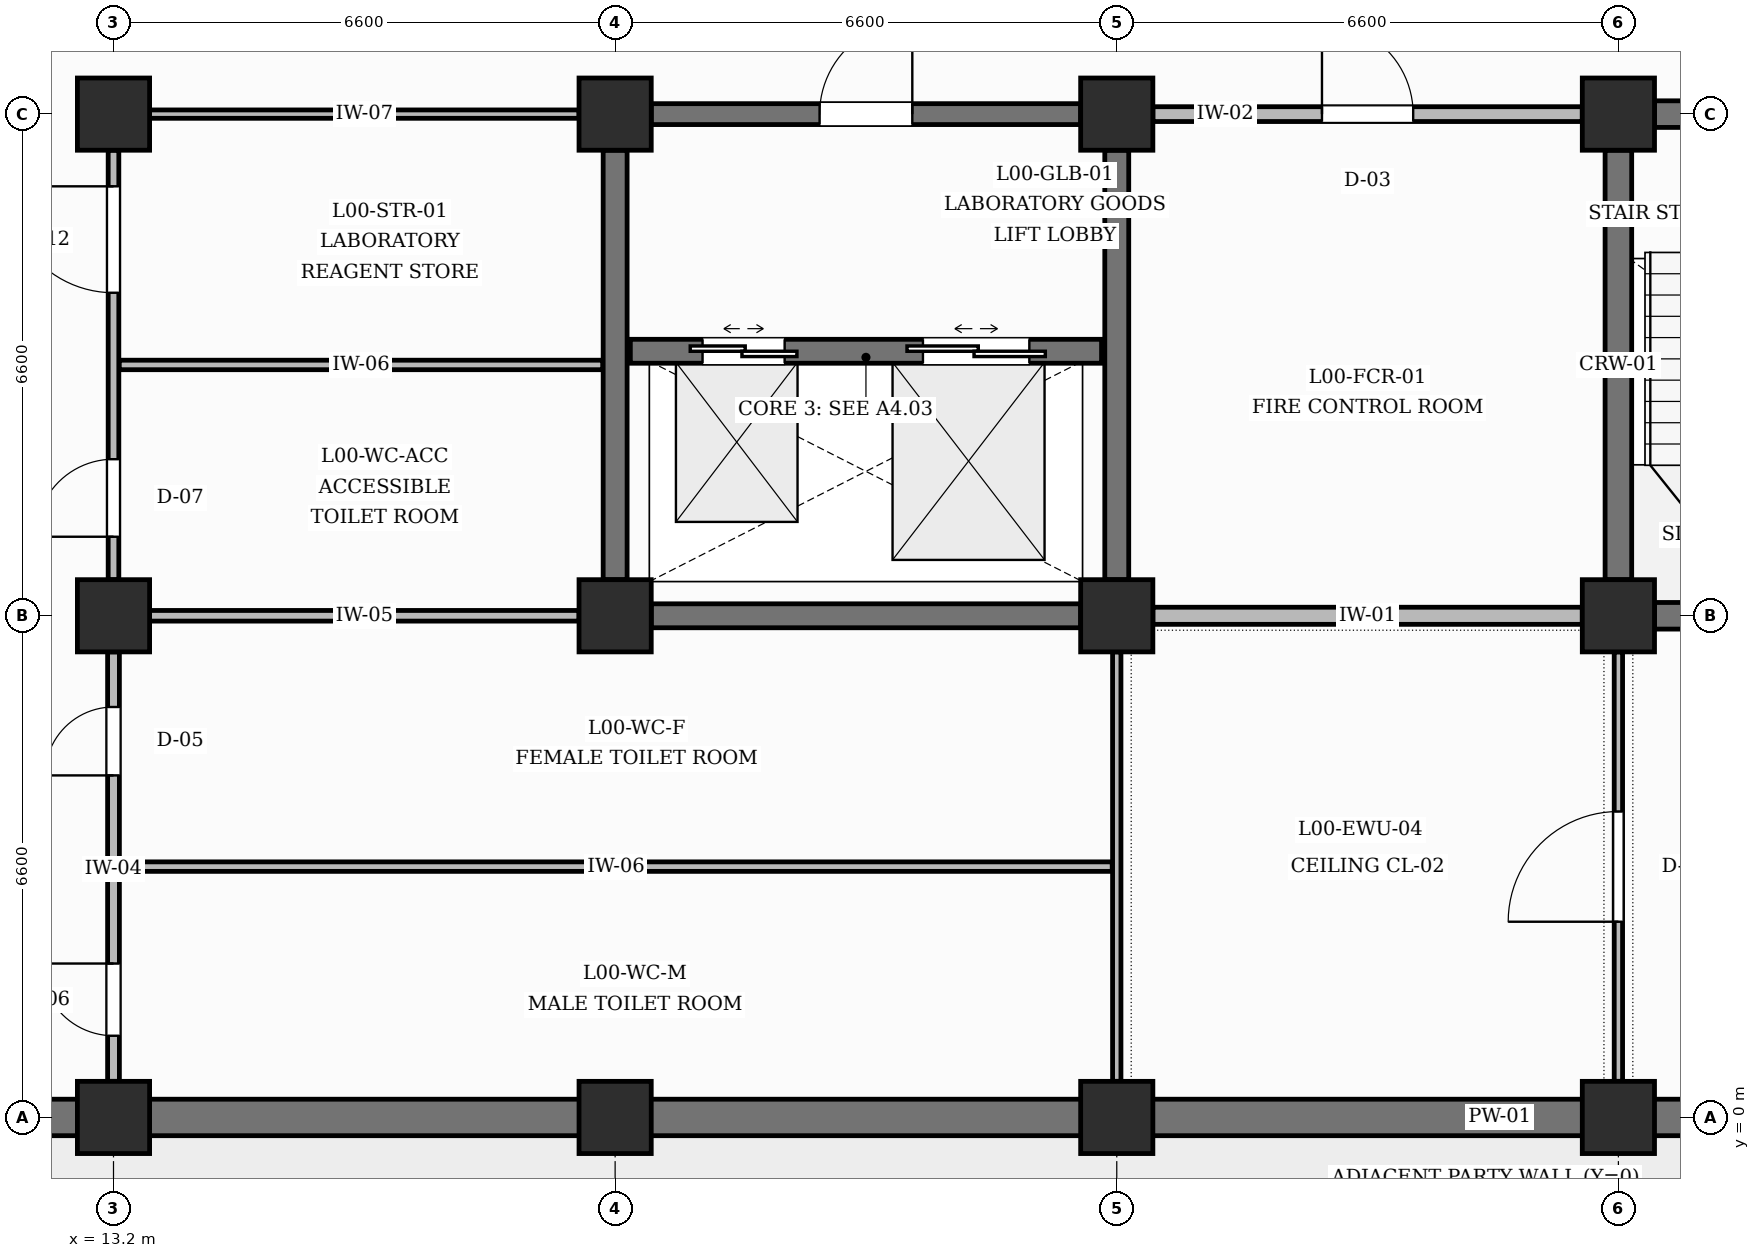
"""IFC4 building model, lengths in metres.
Left out: names, types, materials, properties, quantities, classifications, styles, units other than length and angle.
Written with IfcOpenShell. Run it as: python <this file> out.ifc"""

import sys

from ifc_helpers import new_model, si_unit, direction, frame, frame_2d, origin, origin_2d, place, context, subcontext, project, spatial, rectangle, extrude, element, fill, save


model = new_model("IFC4")
c1 = context("Model", 3, precision=1e-05, world=origin(), true_north=direction((0.0, 1.0)))
c2 = subcontext(c1, "Body", "Model", "MODEL_VIEW")
j1 = project(units=[si_unit("LENGTHUNIT", "METRE"), si_unit("PLANEANGLEUNIT", "RADIAN")], contexts=[c1])
p1 = place(None, origin())
s1 = spatial("IfcSite", under=j1, at=p1, CompositionType="ELEMENT")
p2 = place(p1, origin())
s2 = spatial("IfcBuilding", under=s1, at=p2, CompositionType="ELEMENT")
p3 = place(p2, origin())
s3 = spatial("IfcBuildingStorey", under=s2, at=p3, CompositionType="ELEMENT", Elevation=0.0)
for number, where, z_axis, x_axis in (
    (1, (13.2, 0.0, 0.0), (0.0, 0.0, 1.0), (1.0, 0.0, 0.0)),
    (2, (13.2, 6.6, 0.0), (0.0, 0.0, 1.0), (1.0, 0.0, 0.0)),
    (3, (13.2, 13.2, 0.0), (0.0, 0.0, 1.0), (1.0, 0.0, 0.0)),
    (4, (19.8, 0.0, 0.0), (0.0, 0.0, 1.0), (1.0, 0.0, 0.0)),
    (5, (19.8, 6.6, 0.0), (0.0, 0.0, 1.0), (1.0, 0.0, 0.0)),
    (6, (19.8, 13.2, 0.0), (0.0, 0.0, 1.0), (1.0, 0.0, 0.0)),
    (7, (26.4, 0.0, 0.0), (0.0, 0.0, 1.0), (1.0, 0.0, 0.0)),
    (8, (26.4, 6.6, 0.0), (0.0, 0.0, 1.0), (1.0, 0.0, 0.0)),
    (9, (26.4, 13.2, 0.0), (0.0, 0.0, 1.0), (1.0, 0.0, 0.0)),
    (10, (33.0, 0.0, 0.0), (0.0, 0.0, 1.0), (1.0, 0.0, 0.0)),
    (11, (33.0, 6.6, 0.0), (0.0, 0.0, 1.0), (1.0, 0.0, 0.0)),
    (12, (33.0, 13.2, 0.0), (0.0, 0.0, 1.0), (1.0, 0.0, 0.0)),
):
    element("IfcColumn", number, at=place(p3, frame(where, z_axis=z_axis, x_axis=x_axis)), inside=s3, PredefinedType="COLUMN", context=c2, shape_type="SweptSolid", body=[
        extrude(rectangle(XDim=0.95, YDim=0.95, at=origin_2d()), origin(), (0.0, 0.0, 1.0), 5.4),
    ])
p4 = place(p3, frame((7.075, 0.0, 0.0), z_axis=(0.0, 0.0, 1.0), x_axis=(1.0, 0.0, 0.0)))
e13 = element("IfcWall", 13, at=p4, inside=s3, PredefinedType="SOLIDWALL", context=c2, shape_type="SweptSolid", body=[
    extrude(rectangle(XDim=5.65, YDim=0.48, at=frame_2d((2.825, 0.0))), origin(), (0.0, 0.0, 1.0), 4.45),
])
p5 = place(p3, frame((13.675, 0.0, 0.0), z_axis=(0.0, 0.0, 1.0), x_axis=(1.0, 0.0, 0.0)))
e14 = element("IfcWall", 14, at=p5, inside=s3, PredefinedType="SOLIDWALL", context=c2, shape_type="SweptSolid", body=[
    extrude(rectangle(XDim=5.65, YDim=0.48, at=frame_2d((2.825, 0.0))), origin(), (0.0, 0.0, 1.0), 4.45),
])
p6 = place(p3, frame((20.275, 0.0, 0.0), z_axis=(0.0, 0.0, 1.0), x_axis=(1.0, 0.0, 0.0)))
e15 = element("IfcWall", 15, at=p6, inside=s3, PredefinedType="SOLIDWALL", context=c2, shape_type="SweptSolid", body=[
    extrude(rectangle(XDim=5.65, YDim=0.48, at=frame_2d((2.825, 0.0))), origin(), (0.0, 0.0, 1.0), 4.45),
])
p7 = place(p3, frame((26.875, 0.0, 0.0), z_axis=(0.0, 0.0, 1.0), x_axis=(1.0, 0.0, 0.0)))
e16 = element("IfcWall", 16, at=p7, inside=s3, PredefinedType="SOLIDWALL", context=c2, shape_type="SweptSolid", body=[
    extrude(rectangle(XDim=5.65, YDim=0.48, at=frame_2d((2.825, 0.0))), origin(), (0.0, 0.0, 1.0), 4.45),
])
p8 = place(p3, frame((33.475, 0.0, 0.0), z_axis=(0.0, 0.0, 1.0), x_axis=(1.0, 0.0, 0.0)))
e17 = element("IfcWall", 17, at=p8, inside=s3, PredefinedType="SOLIDWALL", context=c2, shape_type="SweptSolid", body=[
    extrude(rectangle(XDim=5.675, YDim=0.48, at=frame_2d((2.837, 0.0))), origin(), (0.0, 0.0, 1.0), 4.45),
])
p9 = place(p3, frame((33.475, 6.6, 0.0), z_axis=(0.0, 0.0, 1.0), x_axis=(1.0, 0.0, 0.0)))
e18 = element("IfcWall", 18, at=p9, inside=s3, PredefinedType="SHEAR", context=c2, shape_type="SweptSolid", body=[
    extrude(rectangle(XDim=5.675, YDim=0.35, at=frame_2d((2.837, 0.0))), origin(), (0.0, 0.0, 1.0), 4.2),
])
p10 = place(p3, frame((33.475, 13.2, 0.0), z_axis=(0.0, 0.0, 1.0), x_axis=(1.0, 0.0, 0.0)))
e19 = element("IfcWall", 19, at=p10, inside=s3, PredefinedType="SHEAR", context=c2, shape_type="SweptSolid", body=[
    extrude(rectangle(XDim=5.675, YDim=0.35, at=frame_2d((2.837, 0.0))), origin(), (0.0, 0.0, 1.0), 4.3),
])
p11 = place(p10, frame((2.262, 0.0, 0.0)))
e20 = element("IfcOpeningElement", 20, at=p11, cuts=e19, PredefinedType="OPENING", context=c2, shape_type="SweptSolid", body=[
    extrude(rectangle(XDim=1.15, YDim=2.2, at=frame_2d((0.575, 1.1))), frame((0.0, 0.185, 0.0), z_axis=(0.0, -1.0, 0.0), x_axis=(1.0, 0.0, 0.0)), (0.0, 0.0, 1.0), 0.37),
])
p12 = place(p3, frame((33.0, 7.075, 0.0), z_axis=(0.0, 0.0, 1.0), x_axis=(0.0, 1.0, 0.0)))
e21 = element("IfcWall", 21, at=p12, inside=s3, PredefinedType="SHEAR", context=c2, shape_type="SweptSolid", body=[
    extrude(rectangle(XDim=5.65, YDim=0.35, at=frame_2d((2.825, 0.0))), origin(), (0.0, 0.0, 1.0), 4.3),
])
p13 = place(p3, frame((20.275, 6.6, 0.0), z_axis=(0.0, 0.0, 1.0), x_axis=(1.0, 0.0, 0.0)))
e22 = element("IfcWall", 22, at=p13, inside=s3, PredefinedType="SHEAR", context=c2, shape_type="SweptSolid", body=[
    extrude(rectangle(XDim=5.65, YDim=0.315, at=frame_2d((2.825, 0.0))), origin(), (0.0, 0.0, 1.0), 4.2),
])
for number, where, z_axis, x_axis in (
    (23, (19.8, 7.075, 0.0), (0.0, 0.0, 1.0), (0.0, 1.0, 0.0)),
    (24, (26.4, 7.075, 0.0), (0.0, 0.0, 1.0), (0.0, 1.0, 0.0)),
):
    element("IfcWall", number, at=place(p3, frame(where, z_axis=z_axis, x_axis=x_axis)), inside=s3, PredefinedType="SHEAR", context=c2, shape_type="SweptSolid", body=[
        extrude(rectangle(XDim=5.65, YDim=0.315, at=frame_2d((2.825, 0.0))), origin(), (0.0, 0.0, 1.0), 4.3),
    ])
p14 = place(p3, frame((20.275, 13.2, 0.0), z_axis=(0.0, 0.0, 1.0), x_axis=(1.0, 0.0, 0.0)))
e25 = element("IfcWall", 25, at=p14, inside=s3, PredefinedType="SHEAR", context=c2, shape_type="SweptSolid", body=[
    extrude(rectangle(XDim=5.65, YDim=0.275, at=frame_2d((2.825, 0.0))), origin(), (0.0, 0.0, 1.0), 4.3),
])
p15 = place(p14, frame((2.215, 0.0, 0.0)))
e26 = element("IfcOpeningElement", 26, at=p15, cuts=e25, PredefinedType="OPENING", context=c2, shape_type="SweptSolid", body=[
    extrude(rectangle(XDim=1.22, YDim=2.15, at=frame_2d((0.61, 1.075))), frame((0.0, 0.147, 0.0), z_axis=(0.0, -1.0, 0.0), x_axis=(1.0, 0.0, 0.0)), (0.0, 0.0, 1.0), 0.295),
])
p16 = place(p3, frame((20.0, 10.08, 0.0), z_axis=(0.0, 0.0, 1.0), x_axis=(1.0, 0.0, 0.0)))
e27 = element("IfcWall", 27, at=p16, inside=s3, PredefinedType="SHEAR", context=c2, shape_type="SweptSolid", body=[
    extrude(rectangle(XDim=6.2, YDim=0.315, at=frame_2d((3.1, 0.0))), origin(), (0.0, 0.0, 1.0), 5.05),
])
p17 = place(p16, frame((0.95, 0.0, 0.0)))
e28 = element("IfcOpeningElement", 28, at=p17, cuts=e27, PredefinedType="OPENING", context=c2, shape_type="SweptSolid", body=[
    extrude(rectangle(XDim=1.08, YDim=2.15, at=frame_2d((0.54, 1.075))), frame((0.0, 0.167, 0.0), z_axis=(0.0, -1.0, 0.0), x_axis=(1.0, 0.0, 0.0)), (0.0, 0.0, 1.0), 0.335),
])
p18 = place(p16, frame((3.85, 0.0, 0.0)))
e29 = element("IfcOpeningElement", 29, at=p18, cuts=e27, PredefinedType="OPENING", context=c2, shape_type="SweptSolid", body=[
    extrude(rectangle(XDim=1.4, YDim=2.35, at=frame_2d((0.7, 1.175))), frame((0.0, 0.167, 0.0), z_axis=(0.0, -1.0, 0.0), x_axis=(1.0, 0.0, 0.0)), (0.0, 0.0, 1.0), 0.335),
])
p19 = place(p3, frame((13.2, 0.475, 0.0), z_axis=(0.0, 0.0, 1.0), x_axis=(0.0, 1.0, 0.0)))
e30 = element("IfcWall", 30, at=p19, inside=s3, PredefinedType="PARTITIONING", context=c2, shape_type="SweptSolid", body=[
    extrude(rectangle(XDim=5.65, YDim=0.155, at=frame_2d((2.825, 0.0))), origin(), (0.0, 0.0, 1.0), 4.3),
])
p20 = place(p19, frame((0.6, 0.0, 0.0)))
e31 = element("IfcOpeningElement", 31, at=p20, cuts=e30, PredefinedType="OPENING", context=c2, shape_type="SweptSolid", body=[
    extrude(rectangle(XDim=0.95, YDim=2.1, at=frame_2d((0.475, 1.05))), frame((0.0, 0.087, 0.0), z_axis=(0.0, -1.0, 0.0), x_axis=(1.0, 0.0, 0.0)), (0.0, 0.0, 1.0), 0.175),
])
p21 = place(p19, frame((4.025, 0.0, 0.0)))
e32 = element("IfcOpeningElement", 32, at=p21, cuts=e30, PredefinedType="OPENING", context=c2, shape_type="SweptSolid", body=[
    extrude(rectangle(XDim=0.9, YDim=2.1, at=frame_2d((0.45, 1.05))), frame((0.0, 0.087, 0.0), z_axis=(0.0, -1.0, 0.0), x_axis=(1.0, 0.0, 0.0)), (0.0, 0.0, 1.0), 0.175),
])
p22 = place(p3, frame((26.4, 0.475, 0.0), z_axis=(0.0, 0.0, 1.0), x_axis=(0.0, 1.0, 0.0)))
e33 = element("IfcWall", 33, at=p22, inside=s3, PredefinedType="PARTITIONING", context=c2, shape_type="SweptSolid", body=[
    extrude(rectangle(XDim=5.65, YDim=0.11, at=frame_2d((2.825, 0.0))), origin(), (0.0, 0.0, 1.0), 4.3),
])
p23 = place(p3, frame((13.675, 6.6, 0.0), z_axis=(0.0, 0.0, 1.0), x_axis=(1.0, 0.0, 0.0)))
e34 = element("IfcWall", 34, at=p23, inside=s3, PredefinedType="PARTITIONING", context=c2, shape_type="SweptSolid", body=[
    extrude(rectangle(XDim=5.65, YDim=0.14, at=frame_2d((2.825, 0.0))), origin(), (0.0, 0.0, 1.0), 4.3),
])
p24 = place(p3, frame((13.2, 7.075, 0.0), z_axis=(0.0, 0.0, 1.0), x_axis=(0.0, 1.0, 0.0)))
e35 = element("IfcWall", 35, at=p24, inside=s3, PredefinedType="PARTITIONING", context=c2, shape_type="SweptSolid", body=[
    extrude(rectangle(XDim=5.65, YDim=0.14, at=frame_2d((2.825, 0.0))), origin(), (0.0, 0.0, 1.0), 4.3),
])
p25 = place(p24, frame((0.565, 0.0, 0.0)))
e36 = element("IfcOpeningElement", 36, at=p25, cuts=e35, PredefinedType="OPENING", context=c2, shape_type="SweptSolid", body=[
    extrude(rectangle(XDim=1.02, YDim=2.15, at=frame_2d((0.51, 1.075))), frame((0.0, 0.08, 0.0), z_axis=(0.0, -1.0, 0.0), x_axis=(1.0, 0.0, 0.0)), (0.0, 0.0, 1.0), 0.16),
])
p26 = place(p24, frame((3.775, 0.0, 0.0)))
e37 = element("IfcOpeningElement", 37, at=p26, cuts=e35, PredefinedType="OPENING", context=c2, shape_type="SweptSolid", body=[
    extrude(rectangle(XDim=1.4, YDim=2.25, at=frame_2d((0.7, 1.125))), frame((0.0, 0.08, 0.0), z_axis=(0.0, -1.0, 0.0), x_axis=(1.0, 0.0, 0.0)), (0.0, 0.0, 1.0), 0.16),
])
p27 = place(p3, frame((13.675, 13.2, 0.0), z_axis=(0.0, 0.0, 1.0), x_axis=(1.0, 0.0, 0.0)))
e38 = element("IfcWall", 38, at=p27, inside=s3, PredefinedType="PARTITIONING", context=c2, shape_type="SweptSolid", body=[
    extrude(rectangle(XDim=5.65, YDim=0.11, at=frame_2d((2.825, 0.0))), origin(), (0.0, 0.0, 1.0), 4.2),
])
p28 = place(p3, frame((33.0, 0.475, 0.0), z_axis=(0.0, 0.0, 1.0), x_axis=(0.0, 1.0, 0.0)))
e39 = element("IfcWall", 39, at=p28, inside=s3, PredefinedType="PARTITIONING", context=c2, shape_type="SweptSolid", body=[
    extrude(rectangle(XDim=5.65, YDim=0.11, at=frame_2d((2.825, 0.0))), origin(), (0.0, 0.0, 1.0), 4.3),
])
p29 = place(p28, frame((2.1, 0.0, 0.0)))
e40 = element("IfcOpeningElement", 40, at=p29, cuts=e39, PredefinedType="OPENING", context=c2, shape_type="SweptSolid", body=[
    extrude(rectangle(XDim=1.45, YDim=2.25, at=frame_2d((0.725, 1.125))), frame((0.0, 0.065, 0.0), z_axis=(0.0, -1.0, 0.0), x_axis=(1.0, 0.0, 0.0)), (0.0, 0.0, 1.0), 0.13),
])
p30 = place(p3, frame((26.875, 6.6, 0.0), z_axis=(0.0, 0.0, 1.0), x_axis=(1.0, 0.0, 0.0)))
e41 = element("IfcWall", 41, at=p30, inside=s3, PredefinedType="PARTITIONING", context=c2, shape_type="SweptSolid", body=[
    extrude(rectangle(XDim=5.65, YDim=0.225, at=frame_2d((2.825, 0.0))), origin(), (0.0, 0.0, 1.0), 4.3),
])
p31 = place(p3, frame((26.875, 13.2, 0.0), z_axis=(0.0, 0.0, 1.0), x_axis=(1.0, 0.0, 0.0)))
e42 = element("IfcWall", 42, at=p31, inside=s3, PredefinedType="PARTITIONING", context=c2, shape_type="SweptSolid", body=[
    extrude(rectangle(XDim=5.65, YDim=0.195, at=frame_2d((2.825, 0.0))), origin(), (0.0, 0.0, 1.0), 4.2),
])
p32 = place(p31, frame((2.225, 0.0, 0.0)))
e43 = element("IfcOpeningElement", 43, at=p32, cuts=e42, PredefinedType="OPENING", context=c2, shape_type="SweptSolid", body=[
    extrude(rectangle(XDim=1.2, YDim=2.25, at=frame_2d((0.6, 1.125))), frame((0.0, 0.107, 0.0), z_axis=(0.0, -1.0, 0.0), x_axis=(1.0, 0.0, 0.0)), (0.0, 0.0, 1.0), 0.215),
])
p33 = place(p3, frame((13.282, 3.3, 0.0), z_axis=(0.0, 0.0, 1.0), x_axis=(1.0, 0.0, 0.0)))
e44 = element("IfcWall", 44, at=p33, inside=s3, PredefinedType="PARTITIONING", context=c2, shape_type="SweptSolid", body=[
    extrude(rectangle(XDim=13.058, YDim=0.125, at=frame_2d((6.529, 0.0))), origin(), (0.0, 0.0, 1.0), 5.05),
])
p34 = place(p3, frame((13.275, 9.9, 0.0), z_axis=(0.0, 0.0, 1.0), x_axis=(1.0, 0.0, 0.0)))
e45 = element("IfcWall", 45, at=p34, inside=s3, PredefinedType="PARTITIONING", context=c2, shape_type="SweptSolid", body=[
    extrude(rectangle(XDim=6.363, YDim=0.125, at=frame_2d((3.181, 0.0))), origin(), (0.0, 0.0, 1.0), 5.05),
])
p35 = place(p17, origin())
e46 = element("IfcDoor", 46, at=p35, inside=s3, OperationType="DOUBLE_DOOR_SLIDING", PredefinedType="USERDEFINED", context=c2, shape_type="SweptSolid", body=[
    extrude(rectangle(XDim=1.08, YDim=2.15, at=frame_2d((0.54, 1.075))), frame((0.0, 0.025, 0.0), z_axis=(0.0, -1.0, 0.0), x_axis=(1.0, 0.0, 0.0)), (0.0, 0.0, 1.0), 0.05),
])
fill(e28, e46)
p36 = place(p18, origin())
e47 = element("IfcDoor", 47, at=p36, inside=s3, OperationType="DOUBLE_DOOR_SLIDING", PredefinedType="USERDEFINED", context=c2, shape_type="SweptSolid", body=[
    extrude(rectangle(XDim=1.4, YDim=2.35, at=frame_2d((0.7, 1.175))), frame((0.0, 0.025, 0.0), z_axis=(0.0, -1.0, 0.0), x_axis=(1.0, 0.0, 0.0)), (0.0, 0.0, 1.0), 0.05),
])
fill(e29, e47)
p37 = place(p15, origin())
e48 = element("IfcDoor", 48, at=p37, inside=s3, OperationType="SINGLE_SWING_RIGHT", PredefinedType="DOOR", context=c2, shape_type="SweptSolid", body=[
    extrude(rectangle(XDim=1.22, YDim=2.15, at=frame_2d((0.61, 1.075))), frame((0.0, 0.025, 0.0), z_axis=(0.0, -1.0, 0.0), x_axis=(1.0, 0.0, 0.0)), (0.0, 0.0, 1.0), 0.05),
])
fill(e26, e48)
p38 = place(p20, origin())
e49 = element("IfcDoor", 49, at=p38, inside=s3, OperationType="SINGLE_SWING_RIGHT", PredefinedType="DOOR", context=c2, shape_type="SweptSolid", body=[
    extrude(rectangle(XDim=0.95, YDim=2.1, at=frame_2d((0.475, 1.05))), frame((0.0, 0.025, 0.0), z_axis=(0.0, -1.0, 0.0), x_axis=(1.0, 0.0, 0.0)), (0.0, 0.0, 1.0), 0.05),
])
fill(e31, e49)
p39 = place(p21, origin())
e50 = element("IfcDoor", 50, at=p39, inside=s3, OperationType="SINGLE_SWING_LEFT", PredefinedType="DOOR", context=c2, shape_type="SweptSolid", body=[
    extrude(rectangle(XDim=0.9, YDim=2.1, at=frame_2d((0.45, 1.05))), frame((0.0, 0.025, 0.0), z_axis=(0.0, -1.0, 0.0), x_axis=(1.0, 0.0, 0.0)), (0.0, 0.0, 1.0), 0.05),
])
fill(e32, e50)
p40 = place(p25, origin())
e51 = element("IfcDoor", 51, at=p40, inside=s3, OperationType="SINGLE_SWING_LEFT", PredefinedType="DOOR", context=c2, shape_type="SweptSolid", body=[
    extrude(rectangle(XDim=1.02, YDim=2.15, at=frame_2d((0.51, 1.075))), frame((0.0, 0.025, 0.0), z_axis=(0.0, -1.0, 0.0), x_axis=(1.0, 0.0, 0.0)), (0.0, 0.0, 1.0), 0.05),
])
fill(e36, e51)
p41 = place(p26, origin())
e52 = element("IfcDoor", 52, at=p41, inside=s3, OperationType="SINGLE_SWING_RIGHT", PredefinedType="DOOR", context=c2, shape_type="SweptSolid", body=[
    extrude(rectangle(XDim=1.4, YDim=2.25, at=frame_2d((0.7, 1.125))), frame((0.0, 0.025, 0.0), z_axis=(0.0, -1.0, 0.0), x_axis=(1.0, 0.0, 0.0)), (0.0, 0.0, 1.0), 0.05),
])
fill(e37, e52)
p42 = place(p32, origin())
e53 = element("IfcDoor", 53, at=p42, inside=s3, OperationType="SINGLE_SWING_LEFT", PredefinedType="DOOR", context=c2, shape_type="SweptSolid", body=[
    extrude(rectangle(XDim=1.2, YDim=2.25, at=frame_2d((0.6, 1.125))), frame((0.0, 0.025, 0.0), z_axis=(0.0, -1.0, 0.0), x_axis=(1.0, 0.0, 0.0)), (0.0, 0.0, 1.0), 0.05),
])
fill(e43, e53)
p43 = place(p29, origin())
e54 = element("IfcDoor", 54, at=p43, inside=s3, OperationType="SINGLE_SWING_LEFT", PredefinedType="DOOR", context=c2, shape_type="SweptSolid", body=[
    extrude(rectangle(XDim=1.45, YDim=2.25, at=frame_2d((0.725, 1.125))), frame((0.0, 0.025, 0.0), z_axis=(0.0, -1.0, 0.0), x_axis=(1.0, 0.0, 0.0)), (0.0, 0.0, 1.0), 0.05),
])
fill(e40, e54)
save(model, sys.argv[1])
